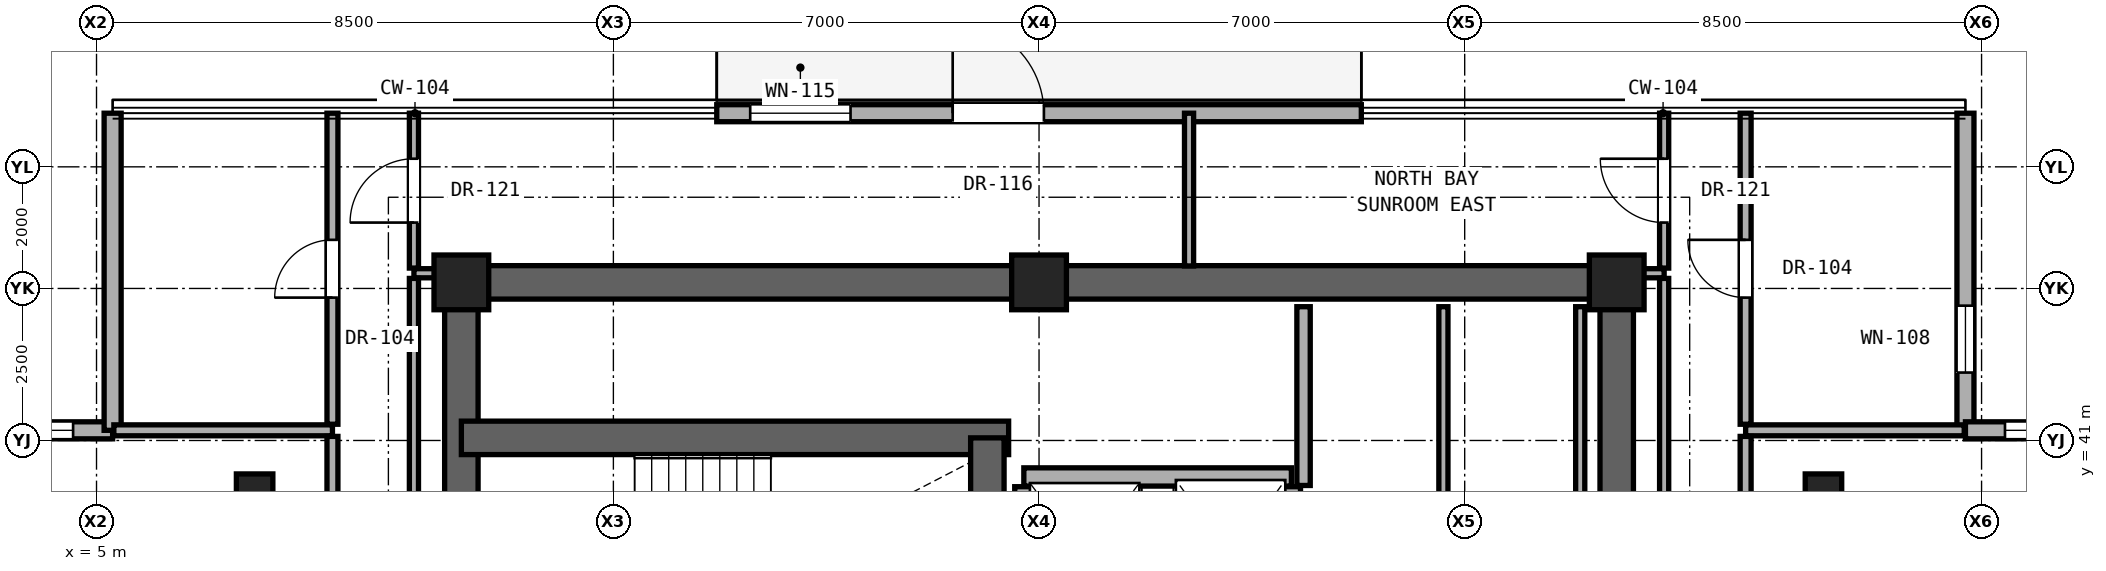
"""IFC4 building model, lengths in metres.
Left out: names, types, materials, properties, quantities, classifications, styles, units other than length and angle.
Written with IfcOpenShell. Run it as: python <this file> out.ifc"""

import sys

from ifc_helpers import new_model, si_unit, direction, frame, frame_2d, origin, origin_2d, place, context, subcontext, project, spatial, rectangle, extrude, element, fill, save


model = new_model("IFC4")
c1 = context("Model", 3, precision=1e-05, world=origin(), true_north=direction((0.0, 1.0)))
c2 = subcontext(c1, "Body", "Model", "MODEL_VIEW")
j1 = project(units=[si_unit("LENGTHUNIT", "METRE"), si_unit("PLANEANGLEUNIT", "RADIAN")], contexts=[c1])
p1 = place(None, origin())
s1 = spatial("IfcSite", under=j1, at=p1, CompositionType="ELEMENT")
p2 = place(p1, origin())
s2 = spatial("IfcBuilding", under=s1, at=p2, CompositionType="ELEMENT")
p3 = place(p2, frame((0.0, 0.0, 196.65)))
s3 = spatial("IfcBuildingStorey", under=s2, at=p3, CompositionType="ELEMENT", Elevation=196.65)
for number, where, z_axis, x_axis in (
    (1, (11.0, 43.6, 0.0), (0.0, 0.0, 1.0), (1.0, 0.0, 0.0)),
    (2, (20.5, 43.6, 0.0), (0.0, 0.0, 1.0), (1.0, 0.0, 0.0)),
    (3, (30.0, 43.6, 0.0), (0.0, 0.0, 1.0), (1.0, 0.0, 0.0)),
):
    element("IfcColumn", number, at=place(p3, frame(where, z_axis=z_axis, x_axis=x_axis)), inside=s3, PredefinedType="COLUMN", context=c2, shape_type="SweptSolid", body=[
        extrude(rectangle(XDim=0.9, YDim=0.9, at=origin_2d()), origin(), (0.0, 0.0, 1.0), 3.25),
    ])
for number, where, z_axis, x_axis in (
    (4, (7.6, 40.0, 0.0), (0.0, 0.0, 1.0), (1.0, 0.0, 0.0)),
    (5, (33.4, 40.0, 0.0), (0.0, 0.0, 1.0), (1.0, 0.0, 0.0)),
):
    element("IfcColumn", number, at=place(p3, frame(where, z_axis=z_axis, x_axis=x_axis)), inside=s3, PredefinedType="PILASTER", context=c2, shape_type="SweptSolid", body=[
        extrude(rectangle(XDim=0.6, YDim=0.9, at=origin_2d()), origin(), (0.0, 0.0, 1.0), 3.25),
    ])
p4 = place(p3, frame((11.0, 43.6, 0.0), z_axis=(0.0, 0.0, 1.0), x_axis=(1.0, 0.0, 0.0)))
e6 = element("IfcWall", 6, at=p4, inside=s3, PredefinedType="SHEAR", context=c2, shape_type="SweptSolid", body=[
    extrude(rectangle(XDim=19.0, YDim=0.55, at=frame_2d((9.5, 0.0))), origin(), (0.0, 0.0, 1.0), 3.05),
])
for number, where, z_axis, x_axis in (
    (7, (11.0, 37.6, 0.0), (0.0, 0.0, 1.0), (0.0, 1.0, 0.0)),
    (8, (30.0, 37.6, 0.0), (0.0, 0.0, 1.0), (0.0, 1.0, 0.0)),
):
    element("IfcWall", number, at=place(p3, frame(where, z_axis=z_axis, x_axis=x_axis)), inside=s3, PredefinedType="SHEAR", context=c2, shape_type="SweptSolid", body=[
        extrude(rectangle(XDim=6.0, YDim=0.55, at=frame_2d((3.0, 0.0))), origin(), (0.0, 0.0, 1.0), 3.05),
    ])
p5 = place(p3, frame((11.0, 41.043, 0.0), z_axis=(0.0, 0.0, 1.0), x_axis=(1.0, 0.0, 0.0)))
e9 = element("IfcWall", 9, at=p5, inside=s3, PredefinedType="SHEAR", context=c2, shape_type="SweptSolid", body=[
    extrude(rectangle(XDim=9.0, YDim=0.55, at=frame_2d((4.5, 0.0))), origin(), (0.0, 0.0, 1.0), 3.05),
])
p6 = place(p3, frame((19.65, 37.6, 0.0), z_axis=(0.0, 0.0, 1.0), x_axis=(0.0, 1.0, 0.0)))
e10 = element("IfcWall", 10, at=p6, inside=s3, PredefinedType="SHEAR", context=c2, shape_type="SweptSolid", body=[
    extrude(rectangle(XDim=3.443, YDim=0.55, at=frame_2d((1.721, 0.0))), origin(), (0.0, 0.0, 1.0), 3.05),
])
p7 = place(p3, frame((15.2, 46.382, 0.0), z_axis=(0.0, 0.0, 1.0), x_axis=(1.0, 0.0, 0.0)))
e11 = element("IfcWall", 11, at=p7, inside=s3, PredefinedType="SOLIDWALL", context=c2, shape_type="SweptSolid", body=[
    extrude(rectangle(XDim=10.6, YDim=0.28, at=frame_2d((5.3, 0.0))), origin(), (0.0, 0.0, 1.0), 3.01),
])
p8 = place(p7, frame((0.55, 0.0, 0.66)))
e12 = element("IfcOpeningElement", 12, at=p8, cuts=e11, PredefinedType="OPENING", context=c2, shape_type="SweptSolid", body=[
    extrude(rectangle(XDim=1.65, YDim=2.2, at=frame_2d((0.825, 1.1))), frame((0.0, 0.15, 0.0), z_axis=(0.0, -1.0, 0.0), x_axis=(1.0, 0.0, 0.0)), (0.0, 0.0, 1.0), 0.3),
])
p9 = place(p7, frame((3.88, 0.0, 0.0)))
e13 = element("IfcOpeningElement", 13, at=p9, cuts=e11, PredefinedType="OPENING", context=c2, shape_type="SweptSolid", body=[
    extrude(rectangle(XDim=1.5, YDim=2.3, at=frame_2d((0.75, 1.15))), frame((0.0, 0.15, 0.0), z_axis=(0.0, -1.0, 0.0), x_axis=(1.0, 0.0, 0.0)), (0.0, 0.0, 1.0), 0.3),
])
p10 = place(p3, frame((35.735, 41.167, 0.0), z_axis=(0.0, 0.0, 1.0), x_axis=(0.0, 1.0, 0.0)))
e14 = element("IfcWall", 14, at=p10, inside=s3, PredefinedType="SOLIDWALL", context=c2, shape_type="SweptSolid", body=[
    extrude(rectangle(XDim=5.215, YDim=0.28, at=frame_2d((2.607, 0.0))), origin(), (0.0, 0.0, 1.0), 3.03),
])
p11 = place(p10, frame((0.95, 0.0, 0.85)))
e15 = element("IfcOpeningElement", 15, at=p11, cuts=e14, PredefinedType="OPENING", context=c2, shape_type="SweptSolid", body=[
    extrude(rectangle(XDim=1.1, YDim=2.0, at=frame_2d((0.55, 1.0))), frame((0.0, 0.15, 0.0), z_axis=(0.0, -1.0, 0.0), x_axis=(1.0, 0.0, 0.0)), (0.0, 0.0, 1.0), 0.3),
])
p12 = place(p3, frame((5.265, 41.167, 0.0), z_axis=(0.0, 0.0, 1.0), x_axis=(-1.0, 0.0, 0.0)))
e16 = element("IfcWall", 16, at=p12, inside=s3, PredefinedType="SOLIDWALL", context=c2, shape_type="SweptSolid", body=[
    extrude(rectangle(XDim=5.215, YDim=0.28, at=frame_2d((2.607, 0.0))), origin(), (0.0, 0.0, 1.0), 3.03),
])
p13 = place(p12, frame((0.65, 0.0, 0.85)))
e17 = element("IfcOpeningElement", 17, at=p13, cuts=e16, PredefinedType="OPENING", context=c2, shape_type="SweptSolid", body=[
    extrude(rectangle(XDim=1.1, YDim=2.0, at=frame_2d((0.55, 1.0))), frame((0.0, 0.15, 0.0), z_axis=(0.0, -1.0, 0.0), x_axis=(1.0, 0.0, 0.0)), (0.0, 0.0, 1.0), 0.3),
])
p14 = place(p3, frame((5.265, 46.382, 0.0), z_axis=(0.0, 0.0, 1.0), x_axis=(0.0, -1.0, 0.0)))
e18 = element("IfcWall", 18, at=p14, inside=s3, PredefinedType="SOLIDWALL", context=c2, shape_type="SweptSolid", body=[
    extrude(rectangle(XDim=5.215, YDim=0.28, at=frame_2d((2.607, 0.0))), origin(), (0.0, 0.0, 1.0), 3.03),
])
p15 = place(p3, frame((40.95, 41.167, 0.0), z_axis=(0.0, 0.0, 1.0), x_axis=(-1.0, 0.0, 0.0)))
e19 = element("IfcWall", 19, at=p15, inside=s3, PredefinedType="SOLIDWALL", context=c2, shape_type="SweptSolid", body=[
    extrude(rectangle(XDim=5.215, YDim=0.28, at=frame_2d((2.607, 0.0))), origin(), (0.0, 0.0, 1.0), 3.03),
])
p16 = place(p15, frame((3.465, 0.0, 0.85)))
e20 = element("IfcOpeningElement", 20, at=p16, cuts=e19, PredefinedType="OPENING", context=c2, shape_type="SweptSolid", body=[
    extrude(rectangle(XDim=1.1, YDim=2.0, at=frame_2d((0.55, 1.0))), frame((0.0, 0.15, 0.0), z_axis=(0.0, -1.0, 0.0), x_axis=(1.0, 0.0, 0.0)), (0.0, 0.0, 1.0), 0.3),
])
p17 = place(p3, frame((20.25, 40.4, 0.0), z_axis=(0.0, 0.0, 1.0), x_axis=(1.0, 0.0, 0.0)))
e21 = element("IfcWall", 21, at=p17, inside=s3, PredefinedType="SOLIDWALL", context=c2, shape_type="SweptSolid", body=[
    extrude(rectangle(XDim=4.4, YDim=0.3, at=frame_2d((2.2, 0.0))), origin(), (0.0, 0.0, 1.0), 3.05),
])
for number, where, z_axis, x_axis in (
    (22, (5.285, 41.167, 0.0), (0.0, 0.0, 1.0), (1.0, 0.0, 0.0)),
    (23, (32.12, 41.167, 0.0), (0.0, 0.0, 1.0), (1.0, 0.0, 0.0)),
):
    element("IfcWall", number, at=place(p3, frame(where, z_axis=z_axis, x_axis=x_axis)), inside=s3, PredefinedType="PARTITIONING", context=c2, shape_type="SweptSolid", body=[
        extrude(rectangle(XDim=3.595, YDim=0.18, at=frame_2d((1.797, 0.0))), origin(), (0.0, 0.0, 1.0), 3.05),
    ])
for number, where, z_axis, x_axis in (
    (24, (10.22, 43.75, 0.0), (0.0, 0.0, 1.0), (1.0, 0.0, 0.0)),
    (25, (30.27, 43.75, 0.0), (0.0, 0.0, 1.0), (1.0, 0.0, 0.0)),
):
    element("IfcWall", number, at=place(p3, frame(where, z_axis=z_axis, x_axis=x_axis)), inside=s3, PredefinedType="PARTITIONING", context=c2, shape_type="SweptSolid", body=[
        extrude(rectangle(XDim=0.51, YDim=0.15, at=frame_2d((0.255, 0.0))), origin(), (0.0, 0.0, 1.0), 3.05),
    ])
p18 = place(p3, frame((8.88, 30.82, 0.0), z_axis=(0.0, 0.0, 1.0), x_axis=(0.0, 1.0, 0.0)))
e26 = element("IfcWall", 26, at=p18, inside=s3, PredefinedType="PARTITIONING", context=c2, shape_type="SweptSolid", body=[
    extrude(rectangle(XDim=10.247, YDim=0.18, at=frame_2d((5.124, 0.0))), origin(), (0.0, 0.0, 1.0), 2.346),
])
p19 = place(p18, frame((4.598, 0.0, 0.0)))
e27 = element("IfcOpeningElement", 27, at=p19, cuts=e26, PredefinedType="OPENING", context=c2, shape_type="SweptSolid", body=[
    extrude(rectangle(XDim=1.05, YDim=2.2, at=frame_2d((0.525, 1.1))), frame((0.0, 0.1, 0.0), z_axis=(0.0, -1.0, 0.0), x_axis=(1.0, 0.0, 0.0)), (0.0, 0.0, 1.0), 0.2),
])
p20 = place(p3, frame((8.88, 41.267, 0.0), z_axis=(0.0, 0.0, 1.0), x_axis=(0.0, 1.0, 0.0)))
e28 = element("IfcWall", 28, at=p20, inside=s3, PredefinedType="PARTITIONING", context=c2, shape_type="SweptSolid", body=[
    extrude(rectangle(XDim=5.115, YDim=0.18, at=frame_2d((2.558, 0.0))), origin(), (0.0, 0.0, 1.0), 3.05),
])
p21 = place(p20, frame((2.083, 0.0, 0.0)))
e29 = element("IfcOpeningElement", 29, at=p21, cuts=e28, PredefinedType="OPENING", context=c2, shape_type="SweptSolid", body=[
    extrude(rectangle(XDim=0.95, YDim=2.15, at=frame_2d((0.475, 1.075))), frame((0.0, 0.1, 0.0), z_axis=(0.0, -1.0, 0.0), x_axis=(1.0, 0.0, 0.0)), (0.0, 0.0, 1.0), 0.2),
])
p22 = place(p3, frame((10.22, 34.535, 0.0), z_axis=(0.0, 0.0, 1.0), x_axis=(0.0, 1.0, 0.0)))
e30 = element("IfcWall", 30, at=p22, inside=s3, PredefinedType="PARTITIONING", context=c2, shape_type="SweptSolid", body=[
    extrude(rectangle(XDim=9.13, YDim=0.15, at=frame_2d((4.565, 0.0))), origin(), (0.0, 0.0, 1.0), 2.442),
])
p23 = place(p3, frame((10.22, 43.835, 0.0), z_axis=(0.0, 0.0, 1.0), x_axis=(0.0, 1.0, 0.0)))
e31 = element("IfcWall", 31, at=p23, inside=s3, PredefinedType="PARTITIONING", context=c2, shape_type="SweptSolid", body=[
    extrude(rectangle(XDim=2.547, YDim=0.15, at=frame_2d((1.273, 0.0))), origin(), (0.0, 0.0, 1.0), 3.05),
])
p24 = place(p23, frame((0.749, 0.0, 0.0)))
e32 = element("IfcOpeningElement", 32, at=p24, cuts=e31, PredefinedType="OPENING", context=c2, shape_type="SweptSolid", body=[
    extrude(rectangle(XDim=1.05, YDim=2.2, at=frame_2d((0.525, 1.1))), frame((0.0, 0.085, 0.0), z_axis=(0.0, -1.0, 0.0), x_axis=(1.0, 0.0, 0.0)), (0.0, 0.0, 1.0), 0.17),
])
p25 = place(p3, frame((20.25, 37.87, 0.0), z_axis=(0.0, 0.0, 1.0), x_axis=(0.0, 1.0, 0.0)))
e33 = element("IfcWall", 33, at=p25, inside=s3, PredefinedType="SOLIDWALL", context=c2, shape_type="SweptSolid", body=[
    extrude(rectangle(XDim=2.37, YDim=0.3, at=frame_2d((1.185, 0.0))), origin(), (0.0, 0.0, 1.0), 3.05),
])
p26 = place(p3, frame((22.967, 43.87, 0.0), z_axis=(0.0, 0.0, 1.0), x_axis=(0.0, 1.0, 0.0)))
e34 = element("IfcWall", 34, at=p26, inside=s3, PredefinedType="PARTITIONING", context=c2, shape_type="SweptSolid", body=[
    extrude(rectangle(XDim=2.512, YDim=0.15, at=frame_2d((1.256, 0.0))), origin(), (0.0, 0.0, 1.0), 3.05),
])
p27 = place(p3, frame((24.65, 37.87, 0.0), z_axis=(0.0, 0.0, 1.0), x_axis=(0.0, 1.0, 0.0)))
e35 = element("IfcWall", 35, at=p27, inside=s3, PredefinedType="SOLIDWALL", context=c2, shape_type="SweptSolid", body=[
    extrude(rectangle(XDim=2.37, YDim=0.3, at=frame_2d((1.185, 0.0))), origin(), (0.0, 0.0, 1.0), 3.05),
])
p28 = place(p3, frame((24.85, 40.26, 0.0), z_axis=(0.0, 0.0, 1.0), x_axis=(0.0, 1.0, 0.0)))
e36 = element("IfcWall", 36, at=p28, inside=s3, PredefinedType="SOLIDWALL", context=c2, shape_type="SweptSolid", body=[
    extrude(rectangle(XDim=2.94, YDim=0.22, at=frame_2d((1.47, 0.0))), origin(), (0.0, 0.0, 1.0), 3.05),
])
for number, where, z_axis, x_axis in (
    (37, (27.15, 37.87, 0.0), (0.0, 0.0, 1.0), (0.0, 1.0, 0.0)),
    (38, (29.4, 37.87, 0.0), (0.0, 0.0, 1.0), (0.0, 1.0, 0.0)),
):
    element("IfcWall", number, at=place(p3, frame(where, z_axis=z_axis, x_axis=x_axis)), inside=s3, PredefinedType="PARTITIONING", context=c2, shape_type="SweptSolid", body=[
        extrude(rectangle(XDim=5.33, YDim=0.15, at=frame_2d((2.665, 0.0))), origin(), (0.0, 0.0, 1.0), 3.05),
    ])
p29 = place(p3, frame((30.78, 34.57, 0.0), z_axis=(0.0, 0.0, 1.0), x_axis=(0.0, 1.0, 0.0)))
e39 = element("IfcWall", 39, at=p29, inside=s3, PredefinedType="PARTITIONING", context=c2, shape_type="SweptSolid", body=[
    extrude(rectangle(XDim=9.095, YDim=0.15, at=frame_2d((4.547, 0.0))), origin(), (0.0, 0.0, 1.0), 2.442),
])
p30 = place(p3, frame((30.78, 43.835, 0.0), z_axis=(0.0, 0.0, 1.0), x_axis=(0.0, 1.0, 0.0)))
e40 = element("IfcWall", 40, at=p30, inside=s3, PredefinedType="PARTITIONING", context=c2, shape_type="SweptSolid", body=[
    extrude(rectangle(XDim=2.547, YDim=0.15, at=frame_2d((1.273, 0.0))), origin(), (0.0, 0.0, 1.0), 3.05),
])
p31 = place(p30, frame((0.749, 0.0, 0.0)))
e41 = element("IfcOpeningElement", 41, at=p31, cuts=e40, PredefinedType="OPENING", context=c2, shape_type="SweptSolid", body=[
    extrude(rectangle(XDim=1.05, YDim=2.2, at=frame_2d((0.525, 1.1))), frame((0.0, 0.085, 0.0), z_axis=(0.0, -1.0, 0.0), x_axis=(1.0, 0.0, 0.0)), (0.0, 0.0, 1.0), 0.17),
])
p32 = place(p3, frame((32.12, 30.82, 0.0), z_axis=(0.0, 0.0, 1.0), x_axis=(0.0, 1.0, 0.0)))
e42 = element("IfcWall", 42, at=p32, inside=s3, PredefinedType="PARTITIONING", context=c2, shape_type="SweptSolid", body=[
    extrude(rectangle(XDim=10.247, YDim=0.18, at=frame_2d((5.124, 0.0))), origin(), (0.0, 0.0, 1.0), 2.346),
])
p33 = place(p32, frame((4.598, 0.0, 0.0)))
e43 = element("IfcOpeningElement", 43, at=p33, cuts=e42, PredefinedType="OPENING", context=c2, shape_type="SweptSolid", body=[
    extrude(rectangle(XDim=1.05, YDim=2.2, at=frame_2d((0.525, 1.1))), frame((0.0, 0.1, 0.0), z_axis=(0.0, -1.0, 0.0), x_axis=(1.0, 0.0, 0.0)), (0.0, 0.0, 1.0), 0.2),
])
p34 = place(p3, frame((32.12, 41.267, 0.0), z_axis=(0.0, 0.0, 1.0), x_axis=(0.0, 1.0, 0.0)))
e44 = element("IfcWall", 44, at=p34, inside=s3, PredefinedType="PARTITIONING", context=c2, shape_type="SweptSolid", body=[
    extrude(rectangle(XDim=5.115, YDim=0.18, at=frame_2d((2.558, 0.0))), origin(), (0.0, 0.0, 1.0), 3.05),
])
p35 = place(p34, frame((2.083, 0.0, 0.0)))
e45 = element("IfcOpeningElement", 45, at=p35, cuts=e44, PredefinedType="OPENING", context=c2, shape_type="SweptSolid", body=[
    extrude(rectangle(XDim=0.95, YDim=2.15, at=frame_2d((0.475, 1.075))), frame((0.0, 0.1, 0.0), z_axis=(0.0, -1.0, 0.0), x_axis=(1.0, 0.0, 0.0)), (0.0, 0.0, 1.0), 0.2),
])
p36 = place(p8, origin())
e46 = element("IfcWindow", 46, at=p36, inside=s3, PartitioningType="SINGLE_PANEL", PredefinedType="WINDOW", context=c2, shape_type="SweptSolid", body=[
    extrude(rectangle(XDim=1.65, YDim=2.2, at=frame_2d((0.825, 1.1))), frame((0.0, 0.03, 0.0), z_axis=(0.0, -1.0, 0.0), x_axis=(1.0, 0.0, 0.0)), (0.0, 0.0, 1.0), 0.06),
])
fill(e12, e46)
p37 = place(p9, origin())
e47 = element("IfcDoor", 47, at=p37, inside=s3, OperationType="SINGLE_SWING_LEFT", PredefinedType="DOOR", context=c2, shape_type="SweptSolid", body=[
    extrude(rectangle(XDim=1.5, YDim=2.3, at=frame_2d((0.75, 1.15))), frame((0.0, 0.025, 0.0), z_axis=(0.0, -1.0, 0.0), x_axis=(1.0, 0.0, 0.0)), (0.0, 0.0, 1.0), 0.05),
])
fill(e13, e47)
p38 = place(p11, origin())
e48 = element("IfcWindow", 48, at=p38, inside=s3, PartitioningType="SINGLE_PANEL", PredefinedType="WINDOW", context=c2, shape_type="SweptSolid", body=[
    extrude(rectangle(XDim=1.1, YDim=2.0, at=frame_2d((0.55, 1.0))), frame((0.0, 0.03, 0.0), z_axis=(0.0, -1.0, 0.0), x_axis=(1.0, 0.0, 0.0)), (0.0, 0.0, 1.0), 0.06),
])
fill(e15, e48)
p39 = place(p13, origin())
e49 = element("IfcWindow", 49, at=p39, inside=s3, PartitioningType="SINGLE_PANEL", PredefinedType="WINDOW", context=c2, shape_type="SweptSolid", body=[
    extrude(rectangle(XDim=1.1, YDim=2.0, at=frame_2d((0.55, 1.0))), frame((0.0, 0.03, 0.0), z_axis=(0.0, -1.0, 0.0), x_axis=(1.0, 0.0, 0.0)), (0.0, 0.0, 1.0), 0.06),
])
fill(e17, e49)
p40 = place(p16, origin())
e50 = element("IfcWindow", 50, at=p40, inside=s3, PartitioningType="SINGLE_PANEL", PredefinedType="WINDOW", context=c2, shape_type="SweptSolid", body=[
    extrude(rectangle(XDim=1.1, YDim=2.0, at=frame_2d((0.55, 1.0))), frame((0.0, 0.03, 0.0), z_axis=(0.0, -1.0, 0.0), x_axis=(1.0, 0.0, 0.0)), (0.0, 0.0, 1.0), 0.06),
])
fill(e20, e50)
p41 = place(p24, origin())
e51 = element("IfcDoor", 51, at=p41, inside=s3, OperationType="SINGLE_SWING_LEFT", PredefinedType="DOOR", context=c2, shape_type="SweptSolid", body=[
    extrude(rectangle(XDim=1.05, YDim=2.2, at=frame_2d((0.525, 1.1))), frame((0.0, 0.025, 0.0), z_axis=(0.0, -1.0, 0.0), x_axis=(1.0, 0.0, 0.0)), (0.0, 0.0, 1.0), 0.05),
])
fill(e32, e51)
p42 = place(p31, origin())
e52 = element("IfcDoor", 52, at=p42, inside=s3, OperationType="SINGLE_SWING_RIGHT", PredefinedType="DOOR", context=c2, shape_type="SweptSolid", body=[
    extrude(rectangle(XDim=1.05, YDim=2.2, at=frame_2d((0.525, 1.1))), frame((0.0, 0.025, 0.0), z_axis=(0.0, -1.0, 0.0), x_axis=(1.0, 0.0, 0.0)), (0.0, 0.0, 1.0), 0.05),
])
fill(e41, e52)
p43 = place(p21, origin())
e53 = element("IfcDoor", 53, at=p43, inside=s3, OperationType="SINGLE_SWING_LEFT", PredefinedType="DOOR", context=c2, shape_type="SweptSolid", body=[
    extrude(rectangle(XDim=0.95, YDim=2.15, at=frame_2d((0.475, 1.075))), frame((0.0, 0.025, 0.0), z_axis=(0.0, -1.0, 0.0), x_axis=(1.0, 0.0, 0.0)), (0.0, 0.0, 1.0), 0.05),
])
fill(e29, e53)
p44 = place(p35, origin())
e54 = element("IfcDoor", 54, at=p44, inside=s3, OperationType="SINGLE_SWING_RIGHT", PredefinedType="DOOR", context=c2, shape_type="SweptSolid", body=[
    extrude(rectangle(XDim=0.95, YDim=2.15, at=frame_2d((0.475, 1.075))), frame((0.0, 0.025, 0.0), z_axis=(0.0, -1.0, 0.0), x_axis=(1.0, 0.0, 0.0)), (0.0, 0.0, 1.0), 0.05),
])
fill(e45, e54)
save(model, sys.argv[1])
